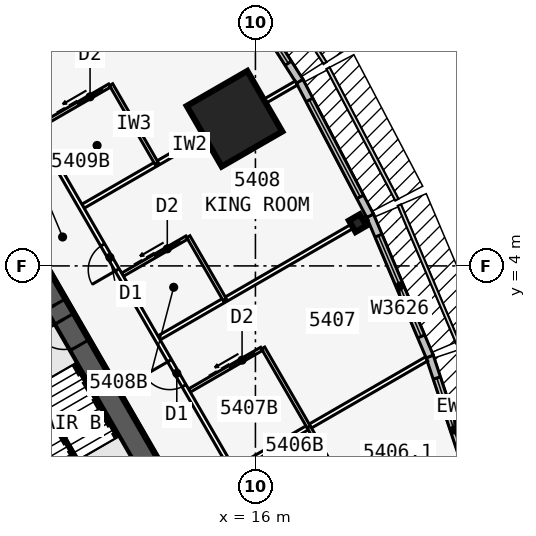
"""IFC4 building model, lengths in metres.
Left out: names, types, materials, properties, quantities, classifications, styles, units other than length and angle.
Written with IfcOpenShell. Run it as: python <this file> out.ifc"""

import sys

from ifc_helpers import new_model, si_unit, direction, frame, frame_2d, origin, origin_2d, place, context, subcontext, project, spatial, rectangle, i_section, extrude, element, fill, save


model = new_model("IFC4")
c1 = context("Model", 3, precision=1e-05, world=origin(), true_north=direction((0.0, 1.0)))
c2 = subcontext(c1, "Body", "Model", "MODEL_VIEW")
j1 = project(units=[si_unit("LENGTHUNIT", "METRE"), si_unit("PLANEANGLEUNIT", "RADIAN")], contexts=[c1])
p1 = place(None, origin())
s1 = spatial("IfcSite", under=j1, at=p1, CompositionType="ELEMENT")
p2 = place(p1, origin())
s2 = spatial("IfcBuilding", under=s1, at=p2, CompositionType="ELEMENT")
p3 = place(p2, frame((0.0, 0.0, 204.5)))
s3 = spatial("IfcBuildingStorey", under=s2, at=p3, CompositionType="ELEMENT", Elevation=204.5)
p4 = place(p3, frame((16.5, -9.526, 0.0), z_axis=(0.0, 0.0, 1.0), x_axis=(-0.499999749417, 0.866025548458, 0.0)))
e1 = element("IfcWall", 1, at=p4, inside=s3, PredefinedType="SHEAR", context=c2, shape_type="SweptSolid", body=[
    extrude(rectangle(XDim=33.0, YDim=0.75, at=frame_2d((16.5, 0.0))), origin(), (0.0, 0.0, 1.0), 3.6),
])
p5 = place(p4, frame((14.15, 0.0, 0.0)))
e2 = element("IfcOpeningElement", 2, at=p5, cuts=e1, PredefinedType="OPENING", context=c2, shape_type="SweptSolid", body=[
    extrude(rectangle(XDim=1.8, YDim=2.13, at=frame_2d((0.9, 1.065))), frame((0.0, 0.385, 0.0), z_axis=(0.0, -1.0, 0.0), x_axis=(1.0, 0.0, 0.0)), (0.0, 0.0, 1.0), 0.77),
])
p6 = place(p4, frame((12.6, 0.0, 0.0)))
e3 = element("IfcOpeningElement", 3, at=p6, cuts=e1, PredefinedType="OPENING", context=c2, shape_type="SweptSolid", body=[
    extrude(rectangle(XDim=1.0, YDim=2.13, at=frame_2d((0.5, 1.065))), frame((0.0, 0.385, 0.0), z_axis=(0.0, -1.0, 0.0), x_axis=(1.0, 0.0, 0.0)), (0.0, 0.0, 1.0), 0.77),
])
p7 = place(p3, frame((10.245, -5.843, 0.0), z_axis=(0.0, 0.0, 1.0), x_axis=(-0.499993009313, 0.866029439822, 0.0)))
e4 = element("IfcWall", 4, at=p7, inside=s3, PredefinedType="SOLIDWALL", context=c2, shape_type="SweptSolid", body=[
    extrude(rectangle(XDim=7.733, YDim=0.25, at=frame_2d((3.866, 0.0))), origin(), (0.0, 0.0, 1.0), 3.435),
])
p8 = place(p3, frame((19.363, 5.406, 0.0), z_axis=(0.0, 0.0, 1.0), x_axis=(0.866025403784, 0.5, 0.0)))
e5 = element("IfcColumn", 5, at=p8, inside=s3, PredefinedType="COLUMN", context=c2, shape_type="SweptSolid", body=[
    extrude(i_section(OverallWidth=0.411, OverallDepth=0.434, WebThickness=0.036, FlangeThickness=0.057, at=origin_2d()), origin(), (0.0, 0.0, 1.0), 3.6),
])
p9 = place(p3, frame((15.312, 8.84, 0.0), z_axis=(0.0, 0.0, 1.0), x_axis=(0.866025403784, 0.5, 0.0)))
e6 = element("IfcColumn", 6, at=p9, inside=s3, PredefinedType="COLUMN", context=c2, shape_type="SweptSolid", body=[
    extrude(rectangle(XDim=2.3, YDim=2.3, at=origin_2d()), origin(), (0.0, 0.0, 1.0), 3.6),
])
p10 = place(p3, frame((23.338, -3.817, 0.0), z_axis=(0.0, 0.0, 1.0), x_axis=(-0.315108478109, 0.949055660656, 0.0)))
e7 = element("IfcWall", 7, at=p10, inside=s3, PredefinedType="STANDARD", context=c2, shape_type="SweptSolid", body=[
    extrude(rectangle(XDim=5.105, YDim=0.25, at=frame_2d((2.552, 0.0))), origin(), (0.0, 0.0, 1.0), 3.435),
])
p11 = place(p10, frame((0.752, 0.0, 0.45)))
e8 = element("IfcOpeningElement", 8, at=p11, cuts=e7, PredefinedType="OPENING", context=c2, shape_type="SweptSolid", body=[
    extrude(rectangle(XDim=3.6, YDim=2.6, at=frame_2d((1.8, 1.3))), frame((0.0, 0.135, 0.0), z_axis=(0.0, -1.0, 0.0), x_axis=(1.0, 0.0, 0.0)), (0.0, 0.0, 1.0), 0.27),
])
p12 = place(p3, frame((21.733, 1.018, 0.0), z_axis=(0.0, 0.0, 1.0), x_axis=(-0.390096809471, 0.920773848044, 0.0)))
e9 = element("IfcWall", 9, at=p12, inside=s3, PredefinedType="STANDARD", context=c2, shape_type="SweptSolid", body=[
    extrude(rectangle(XDim=5.038, YDim=0.25, at=frame_2d((2.519, 0.0))), origin(), (0.0, 0.0, 1.0), 3.435),
])
p13 = place(p12, frame((0.719, 0.0, 0.45)))
e10 = element("IfcOpeningElement", 10, at=p13, cuts=e9, PredefinedType="OPENING", context=c2, shape_type="SweptSolid", body=[
    extrude(rectangle(XDim=3.6, YDim=2.6, at=frame_2d((1.8, 1.3))), frame((0.0, 0.135, 0.0), z_axis=(0.0, -1.0, 0.0), x_axis=(1.0, 0.0, 0.0)), (0.0, 0.0, 1.0), 0.27),
])
p14 = place(p3, frame((19.772, 5.648, 0.0), z_axis=(0.0, 0.0, 1.0), x_axis=(-0.463976002579, 0.885847768542, 0.0)))
e11 = element("IfcWall", 11, at=p14, inside=s3, PredefinedType="STANDARD", context=c2, shape_type="SweptSolid", body=[
    extrude(rectangle(XDim=5.004, YDim=0.25, at=frame_2d((2.502, 0.0))), origin(), (0.0, 0.0, 1.0), 3.435),
])
p15 = place(p14, frame((0.702, 0.0, 0.45)))
e12 = element("IfcOpeningElement", 12, at=p15, cuts=e11, PredefinedType="OPENING", context=c2, shape_type="SweptSolid", body=[
    extrude(rectangle(XDim=3.6, YDim=2.6, at=frame_2d((1.8, 1.3))), frame((0.0, 0.135, 0.0), z_axis=(0.0, -1.0, 0.0), x_axis=(1.0, 0.0, 0.0)), (0.0, 0.0, 1.0), 0.27),
])
p16 = place(p3, frame((17.456, 10.072, 0.0), z_axis=(0.0, 0.0, 1.0), x_axis=(-0.535220361449, 0.844712474568, 0.0)))
e13 = element("IfcWall", 13, at=p16, inside=s3, PredefinedType="STANDARD", context=c2, shape_type="SweptSolid", body=[
    extrude(rectangle(XDim=5.004, YDim=0.25, at=frame_2d((2.502, 0.0))), origin(), (0.0, 0.0, 1.0), 3.435),
])
p17 = place(p16, frame((0.702, 0.0, 0.45)))
e14 = element("IfcOpeningElement", 14, at=p17, cuts=e13, PredefinedType="OPENING", context=c2, shape_type="SweptSolid", body=[
    extrude(rectangle(XDim=3.6, YDim=2.6, at=frame_2d((1.8, 1.3))), frame((0.0, 0.135, 0.0), z_axis=(0.0, -1.0, 0.0), x_axis=(1.0, 0.0, 0.0)), (0.0, 0.0, 1.0), 0.27),
])
p18 = place(p3, frame((20.102, -11.115, 0.0), z_axis=(0.0, 0.0, 1.0), x_axis=(-0.500000265775, 0.866025250339, 0.0)))
e15 = element("IfcWall", 15, at=p18, inside=s3, PredefinedType="PARTITIONING", context=c2, shape_type="SweptSolid", body=[
    extrude(rectangle(XDim=39.354, YDim=0.15, at=frame_2d((19.677, 0.0))), origin(), (0.0, 0.0, 1.0), 3.435),
])
p19 = place(p18, frame((1.665, 0.0, 0.0)))
e16 = element("IfcOpeningElement", 16, at=p19, cuts=e15, PredefinedType="OPENING", context=c2, shape_type="SweptSolid", body=[
    extrude(rectangle(XDim=0.95, YDim=2.13, at=frame_2d((0.475, 1.065))), frame((0.0, 0.085, 0.0), z_axis=(0.0, -1.0, 0.0), x_axis=(1.0, 0.0, 0.0)), (0.0, 0.0, 1.0), 0.17),
])
p20 = place(p18, frame((12.902, 0.0, 0.0)))
e17 = element("IfcOpeningElement", 17, at=p20, cuts=e15, PredefinedType="OPENING", context=c2, shape_type="SweptSolid", body=[
    extrude(rectangle(XDim=0.95, YDim=2.13, at=frame_2d((0.475, 1.065))), frame((0.0, 0.085, 0.0), z_axis=(0.0, -1.0, 0.0), x_axis=(1.0, 0.0, 0.0)), (0.0, 0.0, 1.0), 0.17),
])
p21 = place(p18, frame((17.302, 0.0, 0.0)))
e18 = element("IfcOpeningElement", 18, at=p21, cuts=e15, PredefinedType="OPENING", context=c2, shape_type="SweptSolid", body=[
    extrude(rectangle(XDim=0.95, YDim=2.13, at=frame_2d((0.475, 1.065))), frame((0.0, 0.085, 0.0), z_axis=(0.0, -1.0, 0.0), x_axis=(1.0, 0.0, 0.0)), (0.0, 0.0, 1.0), 0.17),
])
p22 = place(p18, frame((22.902, 0.0, 0.0)))
e19 = element("IfcOpeningElement", 19, at=p22, cuts=e15, PredefinedType="OPENING", context=c2, shape_type="SweptSolid", body=[
    extrude(rectangle(XDim=0.95, YDim=2.13, at=frame_2d((0.475, 1.065))), frame((0.0, 0.085, 0.0), z_axis=(0.0, -1.0, 0.0), x_axis=(1.0, 0.0, 0.0)), (0.0, 0.0, 1.0), 0.17),
])
p23 = place(p18, frame((32.302, 0.0, 0.0)))
e20 = element("IfcOpeningElement", 20, at=p23, cuts=e15, PredefinedType="OPENING", context=c2, shape_type="SweptSolid", body=[
    extrude(rectangle(XDim=0.95, YDim=2.13, at=frame_2d((0.475, 1.065))), frame((0.0, 0.085, 0.0), z_axis=(0.0, -1.0, 0.0), x_axis=(1.0, 0.0, 0.0)), (0.0, 0.0, 1.0), 0.17),
])
p24 = place(p18, frame((37.302, 0.0, 0.0)))
e21 = element("IfcOpeningElement", 21, at=p24, cuts=e15, PredefinedType="OPENING", context=c2, shape_type="SweptSolid", body=[
    extrude(rectangle(XDim=0.95, YDim=2.13, at=frame_2d((0.475, 1.065))), frame((0.0, 0.085, 0.0), z_axis=(0.0, -1.0, 0.0), x_axis=(1.0, 0.0, 0.0)), (0.0, 0.0, 1.0), 0.17),
])
p25 = place(p3, frame((15.329, -2.697, 0.0), z_axis=(0.0, 0.0, 1.0), x_axis=(0.866032413668, 0.499987858329, 0.0)))
e22 = element("IfcWall", 22, at=p25, inside=s3, PredefinedType="PARTITIONING", context=c2, shape_type="SweptSolid", body=[
    extrude(rectangle(XDim=7.273, YDim=0.15, at=frame_2d((3.636, 0.0))), origin(), (0.0, 0.0, 1.0), 2.589),
])
p26 = place(p3, frame((12.829, 1.633, 0.0), z_axis=(0.0, 0.0, 1.0), x_axis=(0.866030558329, 0.49999107196, 0.0)))
e23 = element("IfcWall", 23, at=p26, inside=s3, PredefinedType="PARTITIONING", context=c2, shape_type="SweptSolid", body=[
    extrude(rectangle(XDim=7.894, YDim=0.15, at=frame_2d((3.947, 0.0))), origin(), (0.0, 0.0, 1.0), 2.589),
])
p27 = place(p3, frame((10.329, 5.963, 0.0), z_axis=(0.0, 0.0, 1.0), x_axis=(0.866016460812, 0.500015489362, 0.0)))
e24 = element("IfcWall", 24, at=p27, inside=s3, PredefinedType="PARTITIONING", context=c2, shape_type="SweptSolid", body=[
    extrude(rectangle(XDim=8.101, YDim=0.15, at=frame_2d((4.051, 0.0))), origin(), (0.0, 0.0, 1.0), 2.589),
])
for number, where, z_axis, x_axis in (
    (25, (19.253, -3.895, 0.0), (0.0, 0.0, 1.0), (-0.5, 0.866, 0.0)),
    (26, (17.753, -1.297, 0.0), (0.0, 0.0, 1.0), (-0.5, 0.866, 0.0)),
):
    element("IfcWall", number, at=place(p3, frame(where, z_axis=z_axis, x_axis=x_axis)), inside=s3, PredefinedType="PLUMBINGWALL", context=c2, shape_type="SweptSolid", body=[
        extrude(rectangle(XDim=3.0, YDim=0.12, at=frame_2d((1.5, 0.0))), origin(), (0.0, 0.0, 1.0), 3.435),
    ])
p28 = place(p3, frame((13.829, -0.099, 0.0), z_axis=(0.0, 0.0, 1.0), x_axis=(0.865997131366, 0.500048966069, 0.0)))
e27 = element("IfcWall", 27, at=p28, inside=s3, PredefinedType="PLUMBINGWALL", context=c2, shape_type="SweptSolid", body=[
    extrude(rectangle(XDim=2.74, YDim=0.12, at=frame_2d((1.37, 0.0))), origin(), (0.0, 0.0, 1.0), 3.435),
])
p29 = place(p28, frame((1.55, 0.0, 0.0)))
e28 = element("IfcOpeningElement", 28, at=p29, cuts=e27, PredefinedType="OPENING", context=c2, shape_type="SweptSolid", body=[
    extrude(rectangle(XDim=0.9, YDim=2.13, at=frame_2d((0.45, 1.065))), frame((0.0, 0.07, 0.0), z_axis=(0.0, -1.0, 0.0), x_axis=(1.0, 0.0, 0.0)), (0.0, 0.0, 1.0), 0.14),
])
p30 = place(p3, frame((14.993, 2.883, 0.0), z_axis=(0.0, 0.0, 1.0), x_axis=(-0.500001309137, 0.866024647952, 0.0)))
e29 = element("IfcWall", 29, at=p30, inside=s3, PredefinedType="PLUMBINGWALL", context=c2, shape_type="SweptSolid", body=[
    extrude(rectangle(XDim=2.4, YDim=0.12, at=frame_2d((1.2, 0.0))), origin(), (0.0, 0.0, 1.0), 3.435),
])
p31 = place(p3, frame((11.628, 3.711, 0.0), z_axis=(0.0, 0.0, 1.0), x_axis=(0.866048967903, 0.499959183527, 0.0)))
e30 = element("IfcWall", 30, at=p31, inside=s3, PredefinedType="PLUMBINGWALL", context=c2, shape_type="SweptSolid", body=[
    extrude(rectangle(XDim=2.44, YDim=0.12, at=frame_2d((1.22, 0.0))), origin(), (0.0, 0.0, 1.0), 3.435),
])
p32 = place(p31, frame((1.25, 0.0, 0.0)))
e31 = element("IfcOpeningElement", 31, at=p32, cuts=e30, PredefinedType="OPENING", context=c2, shape_type="SweptSolid", body=[
    extrude(rectangle(XDim=0.9, YDim=2.13, at=frame_2d((0.45, 1.065))), frame((0.0, 0.07, 0.0), z_axis=(0.0, -1.0, 0.0), x_axis=(1.0, 0.0, 0.0)), (0.0, 0.0, 1.0), 0.14),
])
p33 = place(p3, frame((12.753, 7.363, 0.0), z_axis=(0.0, 0.0, 1.0), x_axis=(-0.499990139034, 0.866031096941, 0.0)))
e32 = element("IfcWall", 32, at=p33, inside=s3, PredefinedType="PLUMBINGWALL", context=c2, shape_type="SweptSolid", body=[
    extrude(rectangle(XDim=3.0, YDim=0.12, at=frame_2d((1.5, 0.0))), origin(), (0.0, 0.0, 1.0), 3.435),
])
p34 = place(p3, frame((8.829, 8.561, 0.0), z_axis=(0.0, 0.0, 1.0), x_axis=(0.866035715982, 0.499982138324, 0.0)))
e33 = element("IfcWall", 33, at=p34, inside=s3, PredefinedType="PLUMBINGWALL", context=c2, shape_type="SweptSolid", body=[
    extrude(rectangle(XDim=2.74, YDim=0.12, at=frame_2d((1.37, 0.0))), origin(), (0.0, 0.0, 1.0), 3.435),
])
p35 = place(p34, frame((1.55, 0.0, 0.0)))
e34 = element("IfcOpeningElement", 34, at=p35, cuts=e33, PredefinedType="OPENING", context=c2, shape_type="SweptSolid", body=[
    extrude(rectangle(XDim=0.9, YDim=2.13, at=frame_2d((0.45, 1.065))), frame((0.0, 0.07, 0.0), z_axis=(0.0, -1.0, 0.0), x_axis=(1.0, 0.0, 0.0)), (0.0, 0.0, 1.0), 0.14),
])
p36 = place(p3, frame((10.135, -2.401, 0.0), z_axis=(0.0, 0.0, 1.0), x_axis=(-0.499992232847, 0.866029888106, 0.0)))
e35 = element("IfcWall", 35, at=p36, inside=s3, PredefinedType="SOLIDWALL", context=c2, shape_type="SweptSolid", body=[
    extrude(rectangle(XDim=2.794, YDim=0.1, at=frame_2d((1.397, 0.0))), origin(), (0.0, 0.0, 1.0), 3.6),
])
p37 = place(p11, origin())
e36 = element("IfcWindow", 36, at=p37, inside=s3, PartitioningType="SINGLE_PANEL", PredefinedType="WINDOW", context=c2, shape_type="SweptSolid", body=[
    extrude(rectangle(XDim=3.6, YDim=2.6, at=frame_2d((1.8, 1.3))), frame((0.0, 0.03, 0.0), z_axis=(0.0, -1.0, 0.0), x_axis=(1.0, 0.0, 0.0)), (0.0, 0.0, 1.0), 0.06),
])
fill(e8, e36)
p38 = place(p13, origin())
e37 = element("IfcWindow", 37, at=p38, inside=s3, PartitioningType="SINGLE_PANEL", PredefinedType="WINDOW", context=c2, shape_type="SweptSolid", body=[
    extrude(rectangle(XDim=3.6, YDim=2.6, at=frame_2d((1.8, 1.3))), frame((0.0, 0.03, 0.0), z_axis=(0.0, -1.0, 0.0), x_axis=(1.0, 0.0, 0.0)), (0.0, 0.0, 1.0), 0.06),
])
fill(e10, e37)
p39 = place(p15, origin())
e38 = element("IfcWindow", 38, at=p39, inside=s3, PartitioningType="SINGLE_PANEL", PredefinedType="WINDOW", context=c2, shape_type="SweptSolid", body=[
    extrude(rectangle(XDim=3.6, YDim=2.6, at=frame_2d((1.8, 1.3))), frame((0.0, 0.03, 0.0), z_axis=(0.0, -1.0, 0.0), x_axis=(1.0, 0.0, 0.0)), (0.0, 0.0, 1.0), 0.06),
])
fill(e12, e38)
p40 = place(p17, origin())
e39 = element("IfcWindow", 39, at=p40, inside=s3, PartitioningType="SINGLE_PANEL", PredefinedType="WINDOW", context=c2, shape_type="SweptSolid", body=[
    extrude(rectangle(XDim=3.6, YDim=2.6, at=frame_2d((1.8, 1.3))), frame((0.0, 0.03, 0.0), z_axis=(0.0, -1.0, 0.0), x_axis=(1.0, 0.0, 0.0)), (0.0, 0.0, 1.0), 0.06),
])
fill(e14, e39)
p41 = place(p29, origin())
e40 = element("IfcDoor", 40, at=p41, inside=s3, OperationType="SLIDING_TO_LEFT", PredefinedType="DOOR", context=c2, shape_type="SweptSolid", body=[
    extrude(rectangle(XDim=0.9, YDim=2.13, at=frame_2d((0.45, 1.065))), frame((0.0, 0.025, 0.0), z_axis=(0.0, -1.0, 0.0), x_axis=(1.0, 0.0, 0.0)), (0.0, 0.0, 1.0), 0.05),
])
fill(e28, e40)
p42 = place(p20, origin())
e41 = element("IfcDoor", 41, at=p42, inside=s3, OperationType="SINGLE_SWING_RIGHT", PredefinedType="DOOR", context=c2, shape_type="SweptSolid", body=[
    extrude(rectangle(XDim=0.95, YDim=2.13, at=frame_2d((0.475, 1.065))), frame((0.0, 0.025, 0.0), z_axis=(0.0, -1.0, 0.0), x_axis=(1.0, 0.0, 0.0)), (0.0, 0.0, 1.0), 0.05),
])
fill(e17, e41)
p43 = place(p32, origin())
e42 = element("IfcDoor", 42, at=p43, inside=s3, OperationType="SLIDING_TO_LEFT", PredefinedType="DOOR", context=c2, shape_type="SweptSolid", body=[
    extrude(rectangle(XDim=0.9, YDim=2.13, at=frame_2d((0.45, 1.065))), frame((0.0, 0.025, 0.0), z_axis=(0.0, -1.0, 0.0), x_axis=(1.0, 0.0, 0.0)), (0.0, 0.0, 1.0), 0.05),
])
fill(e31, e42)
p44 = place(p21, origin())
e43 = element("IfcDoor", 43, at=p44, inside=s3, OperationType="SINGLE_SWING_LEFT", PredefinedType="DOOR", context=c2, shape_type="SweptSolid", body=[
    extrude(rectangle(XDim=0.95, YDim=2.13, at=frame_2d((0.475, 1.065))), frame((0.0, 0.025, 0.0), z_axis=(0.0, -1.0, 0.0), x_axis=(1.0, 0.0, 0.0)), (0.0, 0.0, 1.0), 0.05),
])
fill(e18, e43)
p45 = place(p35, origin())
e44 = element("IfcDoor", 44, at=p45, inside=s3, OperationType="SLIDING_TO_LEFT", PredefinedType="DOOR", context=c2, shape_type="SweptSolid", body=[
    extrude(rectangle(XDim=0.9, YDim=2.13, at=frame_2d((0.45, 1.065))), frame((0.0, 0.025, 0.0), z_axis=(0.0, -1.0, 0.0), x_axis=(1.0, 0.0, 0.0)), (0.0, 0.0, 1.0), 0.05),
])
fill(e34, e44)
p46 = place(p5, origin())
e45 = element("IfcDoor", 45, at=p46, inside=s3, OperationType="DOUBLE_DOOR_SINGLE_SWING", PredefinedType="DOOR", context=c2, shape_type="SweptSolid", body=[
    extrude(rectangle(XDim=1.8, YDim=2.13, at=frame_2d((0.9, 1.065))), frame((0.0, 0.025, 0.0), z_axis=(0.0, -1.0, 0.0), x_axis=(1.0, 0.0, 0.0)), (0.0, 0.0, 1.0), 0.05),
])
fill(e2, e45)
p47 = place(p6, origin())
e46 = element("IfcDoor", 46, at=p47, inside=s3, OperationType="SINGLE_SWING_RIGHT", PredefinedType="DOOR", context=c2, shape_type="SweptSolid", body=[
    extrude(rectangle(XDim=1.0, YDim=2.13, at=frame_2d((0.5, 1.065))), frame((0.0, 0.025, 0.0), z_axis=(0.0, -1.0, 0.0), x_axis=(1.0, 0.0, 0.0)), (0.0, 0.0, 1.0), 0.05),
])
fill(e3, e46)
save(model, sys.argv[1])
